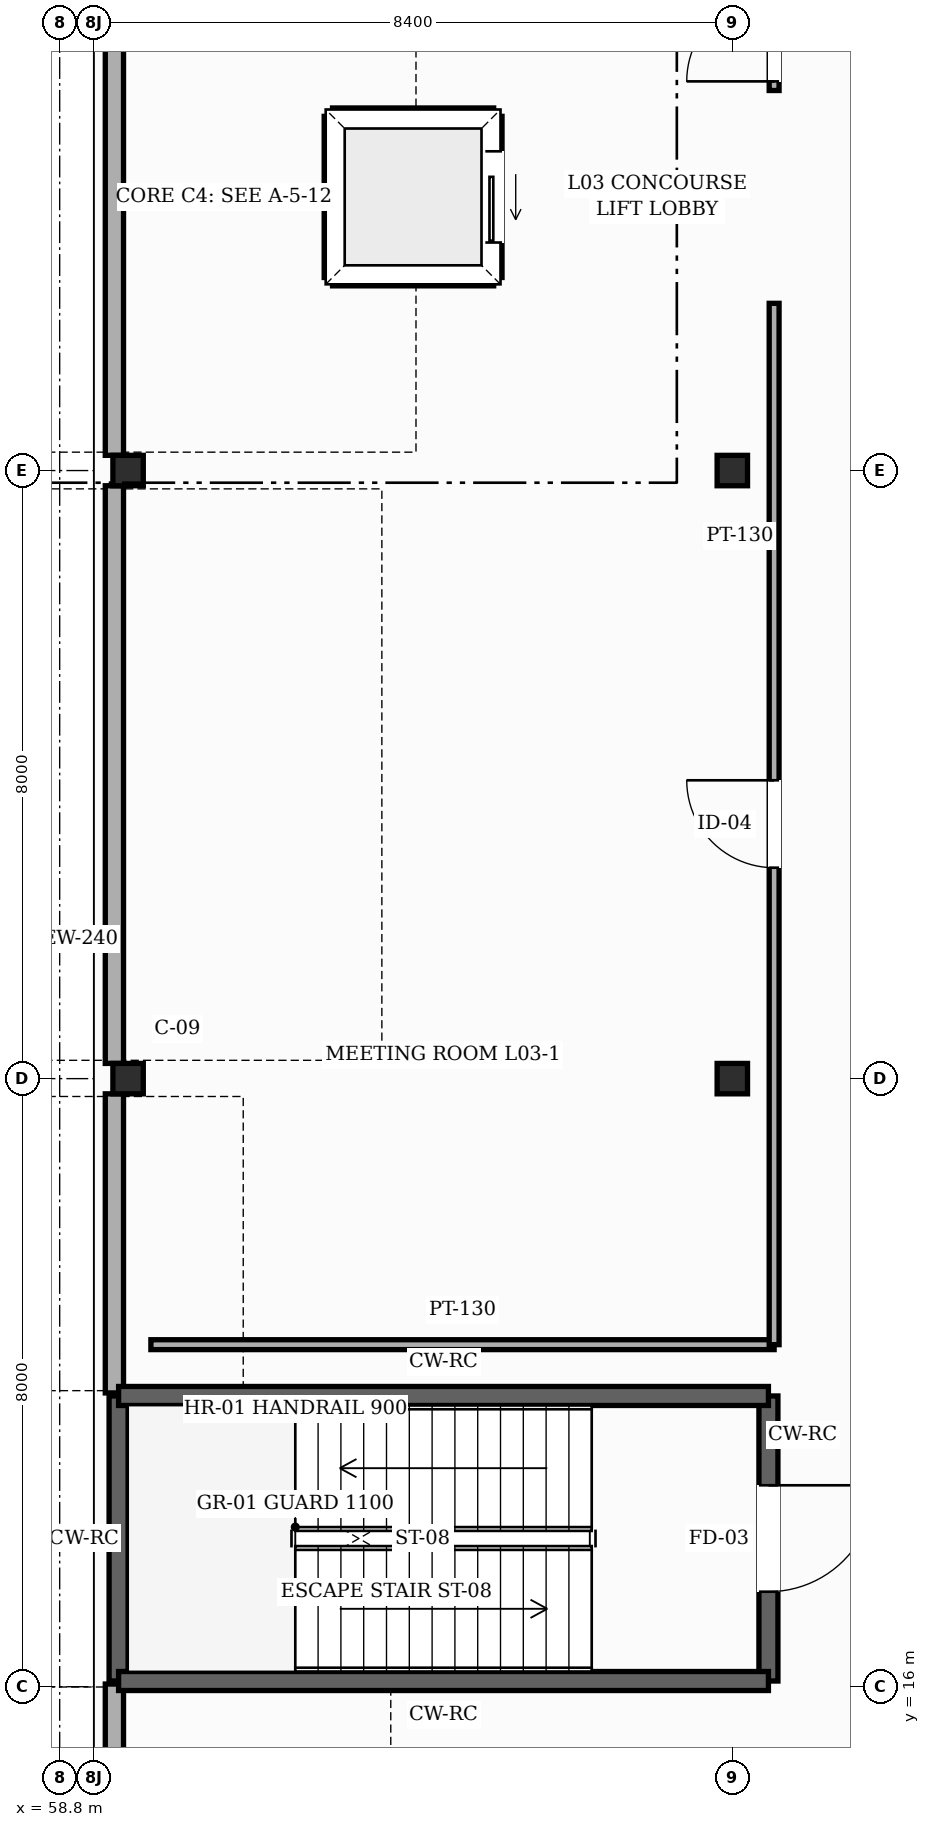
"""IFC4 building model, lengths in metres.
Left out: names, types, materials, properties, quantities, classifications, styles, units other than length and angle.
Written with IfcOpenShell. Run it as: python <this file> out.ifc"""

import sys

from ifc_helpers import new_model, si_unit, direction, frame, frame_2d, origin, origin_2d, place, context, subcontext, project, spatial, rectangle, i_section, extrude, element, fill, save


model = new_model("IFC4")
c1 = context("Model", 3, precision=1e-05, world=origin(), true_north=direction((0.0, 1.0)))
c2 = subcontext(c1, "Body", "Model", "MODEL_VIEW")
j1 = project(units=[si_unit("LENGTHUNIT", "METRE"), si_unit("PLANEANGLEUNIT", "RADIAN")], contexts=[c1])
p1 = place(None, origin())
s1 = spatial("IfcSite", under=j1, at=p1, CompositionType="ELEMENT")
p2 = place(p1, origin())
s2 = spatial("IfcBuilding", under=s1, at=p2, CompositionType="ELEMENT")
p3 = place(p2, frame((0.0, 0.0, 15.0)))
s3 = spatial("IfcBuildingStorey", under=s2, at=p3, CompositionType="ELEMENT", Elevation=15.0)
for number, where, z_axis, x_axis in (
    (1, (59.7, 24.0, 0.0), (0.0, 0.0, 1.0), (1.0, 0.0, 0.0)),
    (2, (59.7, 32.0, 0.0), (0.0, 0.0, 1.0), (1.0, 0.0, 0.0)),
    (3, (67.65, 24.0, 0.0), (0.0, 0.0, 1.0), (1.0, 0.0, 0.0)),
    (4, (67.65, 32.0, 0.0), (0.0, 0.0, 1.0), (1.0, 0.0, 0.0)),
):
    element("IfcColumn", number, at=place(p3, frame(where, z_axis=z_axis, x_axis=x_axis)), inside=s3, PredefinedType="COLUMN", context=c2, shape_type="SweptSolid", body=[
        extrude(i_section(OverallWidth=0.4, OverallDepth=0.4, WebThickness=0.013, FlangeThickness=0.021, FilletRadius=0.022, at=origin_2d()), origin(), (0.0, 0.0, 1.0), 4.8),
    ])
p4 = place(p3, frame((59.52, 8.2, 0.0), z_axis=(0.0, 0.0, 1.0), x_axis=(0.0, 1.0, 0.0)))
e5 = element("IfcWall", 5, at=p4, inside=s3, PredefinedType="SOLIDWALL", context=c2, shape_type="SweptSolid", body=[
    extrude(rectangle(XDim=7.835, YDim=0.24, at=frame_2d((3.917, 0.0))), origin(), (0.0, 0.0, 1.0), 4.545),
])
p5 = place(p3, frame((59.52, 19.865, 0.0), z_axis=(0.0, 0.0, 1.0), x_axis=(0.0, 1.0, 0.0)))
e6 = element("IfcWall", 6, at=p5, inside=s3, PredefinedType="SOLIDWALL", context=c2, shape_type="SweptSolid", body=[
    extrude(rectangle(XDim=3.935, YDim=0.24, at=frame_2d((1.968, 0.0))), origin(), (0.0, 0.0, 1.0), 4.545),
])
p6 = place(p3, frame((59.52, 24.2, 0.0), z_axis=(0.0, 0.0, 1.0), x_axis=(0.0, 1.0, 0.0)))
e7 = element("IfcWall", 7, at=p6, inside=s3, PredefinedType="SOLIDWALL", context=c2, shape_type="SweptSolid", body=[
    extrude(rectangle(XDim=7.6, YDim=0.24, at=frame_2d((3.8, 0.0))), origin(), (0.0, 0.0, 1.0), 3.885),
])
p7 = place(p3, frame((59.52, 32.2, 0.0), z_axis=(0.0, 0.0, 1.0), x_axis=(0.0, 1.0, 0.0)))
e8 = element("IfcWall", 8, at=p7, inside=s3, PredefinedType="SOLIDWALL", context=c2, shape_type="SweptSolid", body=[
    extrude(rectangle(XDim=8.5, YDim=0.24, at=frame_2d((4.25, 0.0))), origin(), (0.0, 0.0, 1.0), 3.885),
])
p8 = place(p3, frame((68.125, 19.825, 0.0), z_axis=(0.0, 0.0, 1.0), x_axis=(0.0, -1.0, 0.0)))
e9 = element("IfcWall", 9, at=p8, inside=s3, PredefinedType="SHEAR", context=c2, shape_type="SweptSolid", body=[
    extrude(rectangle(XDim=3.75, YDim=0.25, at=frame_2d((1.875, 0.0))), origin(), (0.0, 0.0, 1.0), 4.56),
])
p9 = place(p8, frame((1.175, 0.0, 0.0)))
e10 = element("IfcOpeningElement", 10, at=p9, cuts=e9, PredefinedType="OPENING", context=c2, shape_type="SweptSolid", body=[
    extrude(rectangle(XDim=1.4, YDim=2.25, at=frame_2d((0.7, 1.125))), frame((0.0, 0.135, 0.0), z_axis=(0.0, -1.0, 0.0), x_axis=(1.0, 0.0, 0.0)), (0.0, 0.0, 1.0), 0.27),
])
p10 = place(p3, frame((59.575, 16.075, 0.0), z_axis=(0.0, 0.0, 1.0), x_axis=(0.0, 1.0, 0.0)))
e11 = element("IfcWall", 11, at=p10, inside=s3, PredefinedType="SHEAR", context=c2, shape_type="SweptSolid", body=[
    extrude(rectangle(XDim=3.75, YDim=0.25, at=frame_2d((1.875, 0.0))), origin(), (0.0, 0.0, 1.0), 4.56),
])
for number, where, z_axis, x_axis in (
    (12, (59.575, 19.825, 0.0), (0.0, 0.0, 1.0), (1.0, 0.0, 0.0)),
    (13, (68.125, 16.075, 0.0), (0.0, 0.0, 1.0), (-1.0, 0.0, 0.0)),
):
    element("IfcWall", number, at=place(p3, frame(where, z_axis=z_axis, x_axis=x_axis)), inside=s3, PredefinedType="SHEAR", context=c2, shape_type="SweptSolid", body=[
        extrude(rectangle(XDim=8.55, YDim=0.25, at=frame_2d((4.275, 0.0))), origin(), (0.0, 0.0, 1.0), 4.56),
    ])
for number, where, z_axis, x_axis in (
    (14, (62.39, 36.66, 0.0), (0.0, 0.0, 1.0), (1.0, 0.0, 0.0)),
    (15, (62.39, 34.54, 0.0), (0.0, 0.0, 1.0), (1.0, 0.0, 0.0)),
):
    element("IfcWall", number, at=place(p3, frame(where, z_axis=z_axis, x_axis=x_axis)), inside=s3, PredefinedType="SHEAR", context=c2, shape_type="SweptSolid", body=[
        extrude(rectangle(XDim=2.12, YDim=0.22, at=frame_2d((1.06, 0.0))), origin(), (0.0, 0.0, 1.0), 4.56),
    ])
p11 = place(p3, frame((64.51, 34.54, 0.0), z_axis=(0.0, 0.0, 1.0), x_axis=(0.0, 1.0, 0.0)))
e16 = element("IfcWall", 16, at=p11, inside=s3, PredefinedType="SHEAR", context=c2, shape_type="SweptSolid", body=[
    extrude(rectangle(XDim=2.12, YDim=0.22, at=frame_2d((1.06, 0.0))), origin(), (0.0, 0.0, 1.0), 4.56),
])
p12 = place(p11, frame((0.46, 0.0, 0.0)))
e17 = element("IfcOpeningElement", 17, at=p12, cuts=e16, PredefinedType="OPENING", context=c2, shape_type="SweptSolid", body=[
    extrude(rectangle(XDim=1.2, YDim=2.25, at=frame_2d((0.6, 1.125))), frame((0.0, 0.12, 0.0), z_axis=(0.0, -1.0, 0.0), x_axis=(1.0, 0.0, 0.0)), (0.0, 0.0, 1.0), 0.24),
])
p13 = place(p3, frame((62.39, 34.54, 0.0), z_axis=(0.0, 0.0, 1.0), x_axis=(0.0, 1.0, 0.0)))
e18 = element("IfcWall", 18, at=p13, inside=s3, PredefinedType="SHEAR", context=c2, shape_type="SweptSolid", body=[
    extrude(rectangle(XDim=2.12, YDim=0.22, at=frame_2d((1.06, 0.0))), origin(), (0.0, 0.0, 1.0), 4.56),
])
p14 = place(p3, frame((60.0, 20.5, 0.0), z_axis=(0.0, 0.0, 1.0), x_axis=(1.0, 0.0, 0.0)))
e19 = element("IfcWall", 19, at=p14, inside=s3, PredefinedType="PARTITIONING", context=c2, shape_type="SweptSolid", body=[
    extrude(rectangle(XDim=8.2, YDim=0.13, at=frame_2d((4.1, 0.0))), origin(), (0.0, 0.0, 1.0), 4.545),
])
p15 = place(p3, frame((68.2, 20.5, 0.0), z_axis=(0.0, 0.0, 1.0), x_axis=(0.0, 1.0, 0.0)))
e20 = element("IfcWall", 20, at=p15, inside=s3, PredefinedType="PARTITIONING", context=c2, shape_type="SweptSolid", body=[
    extrude(rectangle(XDim=13.7, YDim=0.13, at=frame_2d((6.85, 0.0))), origin(), (0.0, 0.0, 1.0), 4.545),
])
p16 = place(p15, frame((6.275, 0.0, 0.0)))
e21 = element("IfcOpeningElement", 21, at=p16, cuts=e20, PredefinedType="OPENING", context=c2, shape_type="SweptSolid", body=[
    extrude(rectangle(XDim=1.15, YDim=2.22, at=frame_2d((0.575, 1.11))), frame((0.0, 0.075, 0.0), z_axis=(0.0, -1.0, 0.0), x_axis=(1.0, 0.0, 0.0)), (0.0, 0.0, 1.0), 0.15),
])
p17 = place(p3, frame((68.2, 37.0, 0.0), z_axis=(0.0, 0.0, 1.0), x_axis=(0.0, 1.0, 0.0)))
e22 = element("IfcWall", 22, at=p17, inside=s3, PredefinedType="PARTITIONING", context=c2, shape_type="SweptSolid", body=[
    extrude(rectangle(XDim=18.8, YDim=0.13, at=frame_2d((9.4, 0.0))), origin(), (0.0, 0.0, 1.0), 4.545),
])
p18 = place(p17, frame((0.12, 0.0, 0.0)))
e23 = element("IfcOpeningElement", 23, at=p18, cuts=e22, PredefinedType="OPENING", context=c2, shape_type="SweptSolid", body=[
    extrude(rectangle(XDim=1.15, YDim=2.22, at=frame_2d((0.575, 1.11))), frame((0.0, 0.075, 0.0), z_axis=(0.0, -1.0, 0.0), x_axis=(1.0, 0.0, 0.0)), (0.0, 0.0, 1.0), 0.15),
])
p19 = place(p17, frame((13.525, 0.0, 0.0)))
e24 = element("IfcOpeningElement", 24, at=p19, cuts=e22, PredefinedType="OPENING", context=c2, shape_type="SweptSolid", body=[
    extrude(rectangle(XDim=1.15, YDim=2.22, at=frame_2d((0.575, 1.11))), frame((0.0, 0.075, 0.0), z_axis=(0.0, -1.0, 0.0), x_axis=(1.0, 0.0, 0.0)), (0.0, 0.0, 1.0), 0.15),
])
p20 = place(p9, origin())
e25 = element("IfcDoor", 25, at=p20, inside=s3, OperationType="SINGLE_SWING_LEFT", PredefinedType="DOOR", context=c2, shape_type="SweptSolid", body=[
    extrude(rectangle(XDim=1.4, YDim=2.25, at=frame_2d((0.7, 1.125))), frame((0.0, 0.025, 0.0), z_axis=(0.0, -1.0, 0.0), x_axis=(1.0, 0.0, 0.0)), (0.0, 0.0, 1.0), 0.05),
])
fill(e10, e25)
p21 = place(p12, origin())
e26 = element("IfcDoor", 26, at=p21, inside=s3, OperationType="SLIDING_TO_LEFT", PredefinedType="DOOR", context=c2, shape_type="SweptSolid", body=[
    extrude(rectangle(XDim=1.2, YDim=2.25, at=frame_2d((0.6, 1.125))), frame((0.0, 0.025, 0.0), z_axis=(0.0, -1.0, 0.0), x_axis=(1.0, 0.0, 0.0)), (0.0, 0.0, 1.0), 0.05),
])
fill(e17, e26)
p22 = place(p16, origin())
e27 = element("IfcDoor", 27, at=p22, inside=s3, OperationType="SINGLE_SWING_RIGHT", PredefinedType="DOOR", context=c2, shape_type="SweptSolid", body=[
    extrude(rectangle(XDim=1.15, YDim=2.22, at=frame_2d((0.575, 1.11))), frame((0.0, 0.025, 0.0), z_axis=(0.0, -1.0, 0.0), x_axis=(1.0, 0.0, 0.0)), (0.0, 0.0, 1.0), 0.05),
])
fill(e21, e27)
p23 = place(p18, origin())
e28 = element("IfcDoor", 28, at=p23, inside=s3, OperationType="SINGLE_SWING_LEFT", PredefinedType="DOOR", context=c2, shape_type="SweptSolid", body=[
    extrude(rectangle(XDim=1.15, YDim=2.22, at=frame_2d((0.575, 1.11))), frame((0.0, 0.025, 0.0), z_axis=(0.0, -1.0, 0.0), x_axis=(1.0, 0.0, 0.0)), (0.0, 0.0, 1.0), 0.05),
])
fill(e23, e28)
save(model, sys.argv[1])
